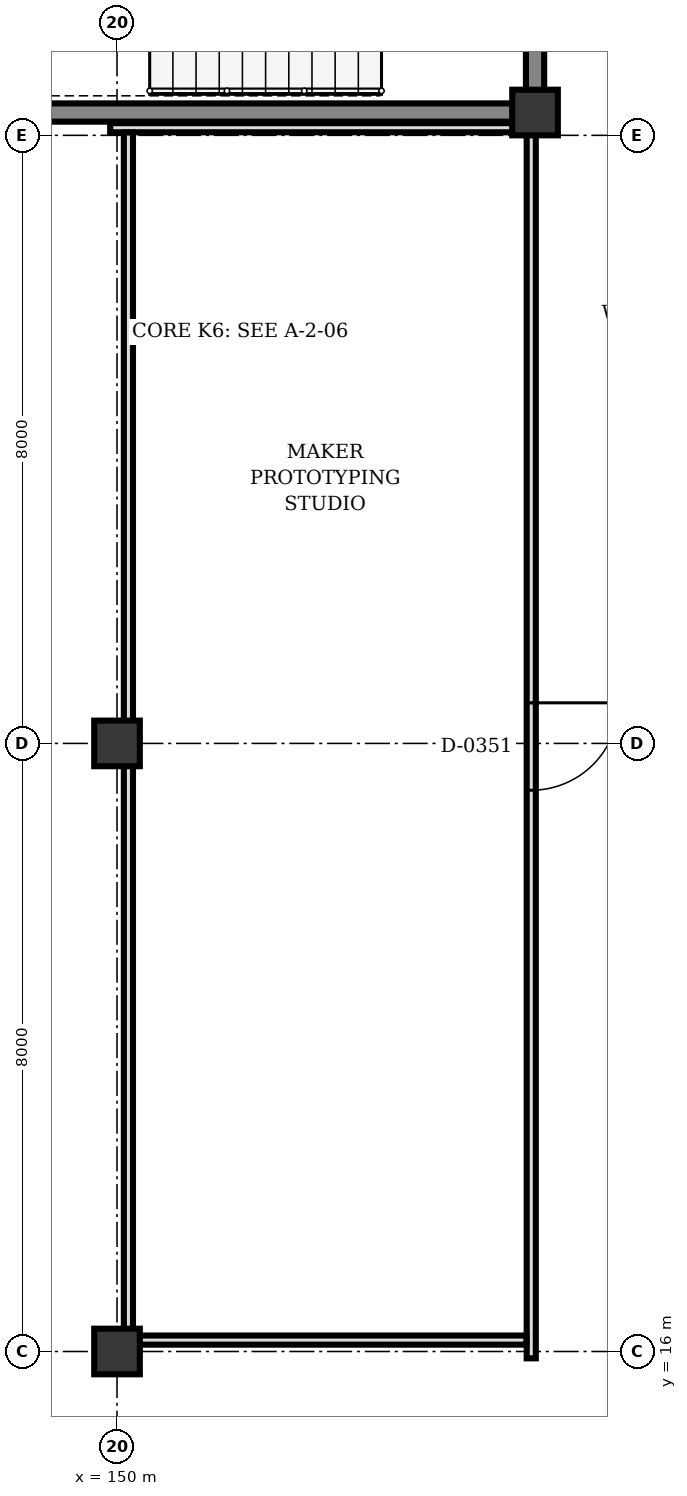
"""IFC4 building model, lengths in metres.
Left out: names, types, materials, properties, quantities, classifications, styles, units other than length and angle.
Written with IfcOpenShell. Run it as: python <this file> out.ifc"""

import sys

from ifc_helpers import new_model, si_unit, direction, frame, frame_2d, origin, origin_2d, place, context, subcontext, project, spatial, rectangle, extrude, element, fill, save


model = new_model("IFC4")
c1 = context("Model", 3, precision=1e-05, world=origin(), true_north=direction((0.0, 1.0)))
c2 = subcontext(c1, "Body", "Model", "MODEL_VIEW")
j1 = project(units=[si_unit("LENGTHUNIT", "METRE"), si_unit("PLANEANGLEUNIT", "RADIAN")], contexts=[c1])
p1 = place(None, origin())
s1 = spatial("IfcSite", under=j1, at=p1, CompositionType="ELEMENT")
p2 = place(p1, origin())
s2 = spatial("IfcBuilding", under=s1, at=p2, CompositionType="ELEMENT")
p3 = place(p2, frame((0.0, 0.0, 4.5)))
s3 = spatial("IfcBuildingStorey", under=s2, at=p3, CompositionType="ELEMENT", Elevation=4.5)
for number, where, z_axis, x_axis in (
    (1, (155.5, 32.3, 0.0), (0.0, 0.0, 1.0), (1.0, 0.0, 0.0)),
    (2, (150.0, 16.0, 0.0), (0.0, 0.0, 1.0), (1.0, 0.0, 0.0)),
    (3, (150.0, 24.0, 0.0), (0.0, 0.0, 1.0), (1.0, 0.0, 0.0)),
):
    element("IfcColumn", number, at=place(p3, frame(where, z_axis=z_axis, x_axis=x_axis)), inside=s3, PredefinedType="COLUMN", context=c2, shape_type="SweptSolid", body=[
        extrude(rectangle(XDim=0.6, YDim=0.6, at=origin_2d()), origin(), (0.0, 0.0, 1.0), 4.0),
    ])
p4 = place(p3, frame((155.5, 36.908, 0.0), z_axis=(0.0, 0.0, 1.0), x_axis=(0.0, -1.0, 0.0)))
e4 = element("IfcWall", 4, at=p4, inside=s3, PredefinedType="SHEAR", context=c2, shape_type="SweptSolid", body=[
    extrude(rectangle(XDim=4.316, YDim=0.24, at=frame_2d((2.158, 0.0))), origin(), (0.0, 0.0, 1.0), 3.74),
])
p5 = place(p4, frame((1.718, 0.0, 0.0)))
e5 = element("IfcOpeningElement", 5, at=p5, cuts=e4, PredefinedType="OPENING", context=c2, shape_type="SweptSolid", body=[
    extrude(rectangle(XDim=0.88, YDim=2.1, at=frame_2d((0.44, 1.05))), frame((0.0, 0.13, 0.0), z_axis=(0.0, -1.0, 0.0), x_axis=(1.0, 0.0, 0.0)), (0.0, 0.0, 1.0), 0.26),
])
p6 = place(p3, frame((155.208, 32.3, 0.0), z_axis=(0.0, 0.0, 1.0), x_axis=(-1.0, 0.0, 0.0)))
e6 = element("IfcWall", 6, at=p6, inside=s3, PredefinedType="SHEAR", context=c2, shape_type="SweptSolid", body=[
    extrude(rectangle(XDim=7.316, YDim=0.24, at=frame_2d((3.658, 0.0))), origin(), (0.0, 0.0, 1.0), 3.74),
])
p7 = place(p3, frame((149.91, 32.1, 0.0), z_axis=(0.0, 0.0, 1.0), x_axis=(1.0, 0.0, 0.0)))
e7 = element("IfcWall", 7, at=p7, inside=s3, PredefinedType="PARTITIONING", context=c2, shape_type="SweptSolid", body=[
    extrude(rectangle(XDim=5.298, YDim=0.12, at=frame_2d((2.649, 0.0))), origin(), (0.0, 0.0, 1.0), 3.7),
])
p8 = place(p3, frame((155.45, 32.008, 0.0), z_axis=(0.0, 0.0, 1.0), x_axis=(0.0, -1.0, 0.0)))
e8 = element("IfcWall", 8, at=p8, inside=s3, PredefinedType="PARTITIONING", context=c2, shape_type="SweptSolid", body=[
    extrude(rectangle(XDim=16.098, YDim=0.12, at=frame_2d((8.049, 0.0))), origin(), (0.0, 0.0, 1.0), 3.052),
])
p9 = place(p8, frame((7.474, 0.0, 0.0)))
e9 = element("IfcOpeningElement", 9, at=p9, cuts=e8, PredefinedType="OPENING", context=c2, shape_type="SweptSolid", body=[
    extrude(rectangle(XDim=1.15, YDim=2.2, at=frame_2d((0.575, 1.1))), frame((0.0, 0.07, 0.0), z_axis=(0.0, -1.0, 0.0), x_axis=(1.0, 0.0, 0.0)), (0.0, 0.0, 1.0), 0.14),
])
p10 = place(p3, frame((155.387, 16.15, 0.0), z_axis=(0.0, 0.0, 1.0), x_axis=(-1.0, 0.0, 0.0)))
e10 = element("IfcWall", 10, at=p10, inside=s3, PredefinedType="PARTITIONING", context=c2, shape_type="SweptSolid", body=[
    extrude(rectangle(XDim=5.095, YDim=0.12, at=frame_2d((2.547, 0.0))), origin(), (0.0, 0.0, 1.0), 3.052),
])
p11 = place(p3, frame((150.15, 16.292, 0.0), z_axis=(0.0, 0.0, 1.0), x_axis=(0.0, 1.0, 0.0)))
e11 = element("IfcWall", 11, at=p11, inside=s3, PredefinedType="PARTITIONING", context=c2, shape_type="SweptSolid", body=[
    extrude(rectangle(XDim=7.416, YDim=0.12, at=frame_2d((3.708, 0.0))), origin(), (0.0, 0.0, 1.0), 3.052),
])
p12 = place(p3, frame((150.15, 24.292, 0.0), z_axis=(0.0, 0.0, 1.0), x_axis=(0.0, 1.0, 0.0)))
e12 = element("IfcWall", 12, at=p12, inside=s3, PredefinedType="PARTITIONING", context=c2, shape_type="SweptSolid", body=[
    extrude(rectangle(XDim=7.745, YDim=0.12, at=frame_2d((3.873, 0.0))), origin(), (0.0, 0.0, 1.0), 3.052),
])
p13 = place(p9, origin())
e13 = element("IfcDoor", 13, at=p13, inside=s3, OperationType="SINGLE_SWING_LEFT", PredefinedType="DOOR", context=c2, shape_type="SweptSolid", body=[
    extrude(rectangle(XDim=1.15, YDim=2.2, at=frame_2d((0.575, 1.1))), frame((0.0, 0.025, 0.0), z_axis=(0.0, -1.0, 0.0), x_axis=(1.0, 0.0, 0.0)), (0.0, 0.0, 1.0), 0.05),
])
fill(e9, e13)
save(model, sys.argv[1])
